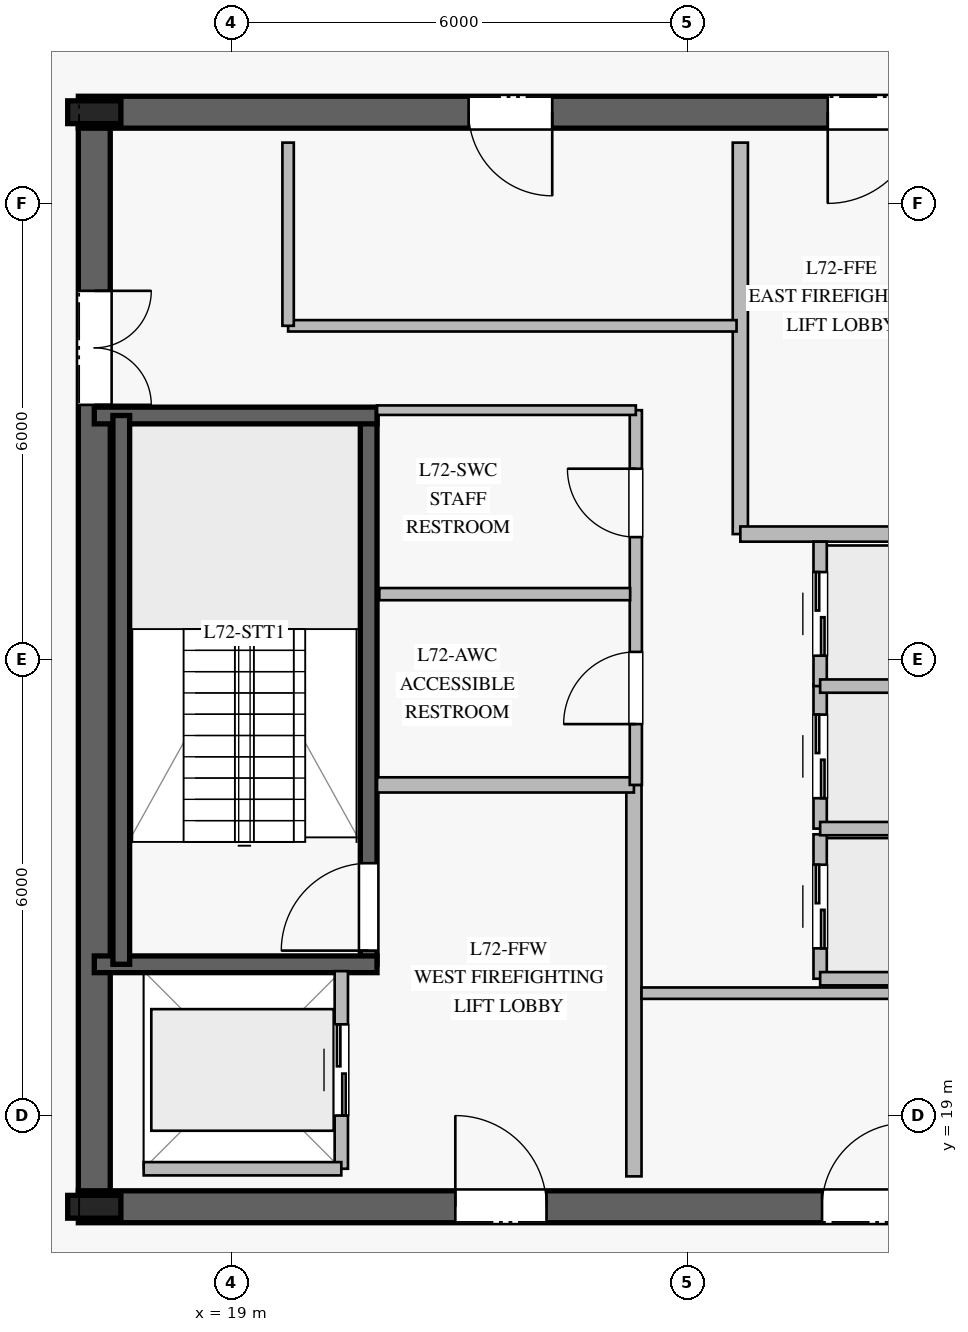
"""IFC4 building model, lengths in metres.
Left out: names, types, materials, properties, quantities, classifications, styles, units other than length and angle.
Written with IfcOpenShell. Run it as: python <this file> out.ifc"""

import sys

from ifc_helpers import new_model, si_unit, direction, frame, frame_2d, origin, origin_2d, place, context, subcontext, project, spatial, rectangle, i_section, extrude, element, fill, save


model = new_model("IFC4")
c1 = context("Model", 3, precision=1e-05, world=origin(), true_north=direction((0.0, 1.0)))
c2 = subcontext(c1, "Body", "Model", "MODEL_VIEW")
j1 = project(units=[si_unit("LENGTHUNIT", "METRE"), si_unit("PLANEANGLEUNIT", "RADIAN")], contexts=[c1])
p1 = place(None, origin())
s1 = spatial("IfcSite", under=j1, at=p1, CompositionType="ELEMENT")
p2 = place(p1, origin())
s2 = spatial("IfcBuilding", under=s1, at=p2, CompositionType="ELEMENT")
p3 = place(p2, frame((0.0, 0.0, 298.2)))
s3 = spatial("IfcBuildingStorey", under=s2, at=p3, CompositionType="ELEMENT", Elevation=298.2)
p4 = place(p3, frame((16.99, 17.8, 0.0), z_axis=(0.0, 0.0, 1.0), x_axis=(1.0, 0.0, 0.0)))
e1 = element("IfcWall", 1, at=p4, inside=s3, PredefinedType="SHEAR", context=c2, shape_type="SweptSolid", body=[
    extrude(rectangle(XDim=16.02, YDim=0.42, at=frame_2d((8.01, 0.0))), origin(), (0.0, 0.0, 1.0), 3.78),
])
p5 = place(p4, frame((4.96, 0.0, 0.0)))
e2 = element("IfcOpeningElement", 2, at=p5, cuts=e1, PredefinedType="OPENING", context=c2, shape_type="SweptSolid", body=[
    extrude(rectangle(XDim=1.2, YDim=2.25, at=frame_2d((0.6, 1.125))), frame((0.0, 0.22, 0.0), z_axis=(0.0, -1.0, 0.0), x_axis=(1.0, 0.0, 0.0)), (0.0, 0.0, 1.0), 0.44),
])
p6 = place(p4, frame((13.91, 0.0, 0.0)))
e3 = element("IfcOpeningElement", 3, at=p6, cuts=e1, PredefinedType="OPENING", context=c2, shape_type="SweptSolid", body=[
    extrude(rectangle(XDim=0.9, YDim=2.1, at=frame_2d((0.45, 1.05))), frame((0.0, 0.22, 0.0), z_axis=(0.0, -1.0, 0.0), x_axis=(1.0, 0.0, 0.0)), (0.0, 0.0, 1.0), 0.44),
])
p7 = place(p4, frame((9.785, 0.0, 0.0)))
e4 = element("IfcOpeningElement", 4, at=p7, cuts=e1, PredefinedType="OPENING", context=c2, shape_type="SweptSolid", body=[
    extrude(rectangle(XDim=1.1, YDim=2.2, at=frame_2d((0.55, 1.1))), frame((0.0, 0.22, 0.0), z_axis=(0.0, -1.0, 0.0), x_axis=(1.0, 0.0, 0.0)), (0.0, 0.0, 1.0), 0.44),
])
p8 = place(p3, frame((33.01, 32.2, 0.0), z_axis=(0.0, 0.0, 1.0), x_axis=(-1.0, 0.0, 0.0)))
e5 = element("IfcWall", 5, at=p8, inside=s3, PredefinedType="SHEAR", context=c2, shape_type="SweptSolid", body=[
    extrude(rectangle(XDim=16.02, YDim=0.42, at=frame_2d((8.01, 0.0))), origin(), (0.0, 0.0, 1.0), 3.78),
])
p9 = place(p8, frame((4.96, 0.0, 0.0)))
e6 = element("IfcOpeningElement", 6, at=p9, cuts=e5, PredefinedType="OPENING", context=c2, shape_type="SweptSolid", body=[
    extrude(rectangle(XDim=1.2, YDim=2.25, at=frame_2d((0.6, 1.125))), frame((0.0, 0.22, 0.0), z_axis=(0.0, -1.0, 0.0), x_axis=(1.0, 0.0, 0.0)), (0.0, 0.0, 1.0), 0.44),
])
p10 = place(p8, frame((9.785, 0.0, 0.0)))
e7 = element("IfcOpeningElement", 7, at=p10, cuts=e5, PredefinedType="OPENING", context=c2, shape_type="SweptSolid", body=[
    extrude(rectangle(XDim=1.1, YDim=2.2, at=frame_2d((0.55, 1.1))), frame((0.0, 0.22, 0.0), z_axis=(0.0, -1.0, 0.0), x_axis=(1.0, 0.0, 0.0)), (0.0, 0.0, 1.0), 0.44),
])
p11 = place(p3, frame((17.2, 31.99, 0.0), z_axis=(0.0, 0.0, 1.0), x_axis=(0.0, -1.0, 0.0)))
e8 = element("IfcWall", 8, at=p11, inside=s3, PredefinedType="SHEAR", context=c2, shape_type="SweptSolid", body=[
    extrude(rectangle(XDim=13.98, YDim=0.42, at=frame_2d((6.99, 0.0))), origin(), (0.0, 0.0, 1.0), 3.78),
])
p12 = place(p11, frame((2.14, 0.0, 0.0)))
e9 = element("IfcOpeningElement", 9, at=p12, cuts=e8, PredefinedType="OPENING", context=c2, shape_type="SweptSolid", body=[
    extrude(rectangle(XDim=1.5, YDim=2.2, at=frame_2d((0.75, 1.1))), frame((0.0, 0.22, 0.0), z_axis=(0.0, -1.0, 0.0), x_axis=(1.0, 0.0, 0.0)), (0.0, 0.0, 1.0), 0.44),
])
for number, where, z_axis, x_axis in (
    (10, (17.2, 17.8, 0.0), (0.0, 0.0, 1.0), (1.0, 0.0, 0.0)),
    (11, (17.2, 32.2, 0.0), (0.0, 0.0, 1.0), (1.0, 0.0, 0.0)),
):
    element("IfcColumn", number, at=place(p3, frame(where, z_axis=z_axis, x_axis=x_axis)), inside=s3, PredefinedType="COLUMN", context=c2, shape_type="SweptSolid", body=[
        extrude(i_section(OverallWidth=0.3, OverallDepth=0.7, WebThickness=0.017, FlangeThickness=0.032, at=origin_2d()), origin(), (0.0, 0.0, 1.0), 4.0),
    ])
p13 = place(p3, frame((20.81, 20.99, 0.0), z_axis=(0.0, 0.0, 1.0), x_axis=(0.0, 1.0, 0.0)))
e12 = element("IfcWall", 12, at=p13, inside=s3, PredefinedType="SOLIDWALL", context=c2, shape_type="SweptSolid", body=[
    extrude(rectangle(XDim=7.22, YDim=0.22, at=frame_2d((3.61, 0.0))), origin(), (0.0, 0.0, 1.0), 3.78),
])
p14 = place(p13, frame((0.18, 0.0, 0.0)))
e13 = element("IfcOpeningElement", 13, at=p14, cuts=e12, PredefinedType="OPENING", context=c2, shape_type="SweptSolid", body=[
    extrude(rectangle(XDim=1.15, YDim=2.2, at=frame_2d((0.575, 1.1))), frame((0.0, 0.12, 0.0), z_axis=(0.0, -1.0, 0.0), x_axis=(1.0, 0.0, 0.0)), (0.0, 0.0, 1.0), 0.24),
])
for number, where, z_axis, x_axis in (
    (14, (17.2, 20.99, 0.0), (0.0, 0.0, 1.0), (1.0, 0.0, 0.0)),
    (15, (17.2, 28.21, 0.0), (0.0, 0.0, 1.0), (1.0, 0.0, 0.0)),
):
    element("IfcWall", number, at=place(p3, frame(where, z_axis=z_axis, x_axis=x_axis)), inside=s3, PredefinedType="SOLIDWALL", context=c2, shape_type="SweptSolid", body=[
        extrude(rectangle(XDim=3.72, YDim=0.22, at=frame_2d((1.86, 0.0))), origin(), (0.0, 0.0, 1.0), 3.78),
    ])
p15 = place(p3, frame((17.555, 28.21, 0.0), z_axis=(0.0, 0.0, 1.0), x_axis=(0.0, -1.0, 0.0)))
e16 = element("IfcWall", 16, at=p15, inside=s3, PredefinedType="SOLIDWALL", context=c2, shape_type="SweptSolid", body=[
    extrude(rectangle(XDim=7.22, YDim=0.22, at=frame_2d((3.61, 0.0))), origin(), (0.0, 0.0, 1.0), 3.78),
])
p16 = place(p3, frame((24.3, 18.2, 0.0), z_axis=(0.0, 0.0, 1.0), x_axis=(0.0, 1.0, 0.0)))
e17 = element("IfcWall", 17, at=p16, inside=s3, PredefinedType="PARTITIONING", context=c2, shape_type="SweptSolid", body=[
    extrude(rectangle(XDim=5.15, YDim=0.2, at=frame_2d((2.575, 0.0))), origin(), (0.0, 0.0, 1.0), 3.78),
])
p17 = place(p3, frame((20.92, 23.35, 0.0), z_axis=(0.0, 0.0, 1.0), x_axis=(1.0, 0.0, 0.0)))
e18 = element("IfcWall", 18, at=p17, inside=s3, PredefinedType="PARTITIONING", context=c2, shape_type="SweptSolid", body=[
    extrude(rectangle(XDim=3.38, YDim=0.2, at=frame_2d((1.69, 0.0))), origin(), (0.0, 0.0, 1.0), 3.78),
])
p18 = place(p3, frame((25.7, 26.65, 0.0), z_axis=(0.0, 0.0, 1.0), x_axis=(0.0, 1.0, 0.0)))
e19 = element("IfcWall", 19, at=p18, inside=s3, PredefinedType="PARTITIONING", context=c2, shape_type="SweptSolid", body=[
    extrude(rectangle(XDim=5.15, YDim=0.2, at=frame_2d((2.575, 0.0))), origin(), (0.0, 0.0, 1.0), 3.78),
])
p19 = place(p3, frame((25.7, 26.65, 0.0), z_axis=(0.0, 0.0, 1.0), x_axis=(1.0, 0.0, 0.0)))
e20 = element("IfcWall", 20, at=p19, inside=s3, PredefinedType="PARTITIONING", context=c2, shape_type="SweptSolid", body=[
    extrude(rectangle(XDim=3.38, YDim=0.2, at=frame_2d((1.69, 0.0))), origin(), (0.0, 0.0, 1.0), 3.78),
])
p20 = place(p3, frame((24.325, 23.35, 0.0), z_axis=(0.0, 0.0, 1.0), x_axis=(0.0, 1.0, 0.0)))
e21 = element("IfcWall", 21, at=p20, inside=s3, PredefinedType="PLUMBINGWALL", context=c2, shape_type="SweptSolid", body=[
    extrude(rectangle(XDim=4.93, YDim=0.16, at=frame_2d((2.465, 0.0))), origin(), (0.0, 0.0, 1.0), 3.78),
])
p21 = place(p20, frame((0.8, 0.0, 0.0)))
e22 = element("IfcOpeningElement", 22, at=p21, cuts=e21, PredefinedType="OPENING", context=c2, shape_type="SweptSolid", body=[
    extrude(rectangle(XDim=0.95, YDim=2.1, at=frame_2d((0.475, 1.05))), frame((0.0, 0.09, 0.0), z_axis=(0.0, -1.0, 0.0), x_axis=(1.0, 0.0, 0.0)), (0.0, 0.0, 1.0), 0.18),
])
p22 = place(p20, frame((3.26, 0.0, 0.0)))
e23 = element("IfcOpeningElement", 23, at=p22, cuts=e21, PredefinedType="OPENING", context=c2, shape_type="SweptSolid", body=[
    extrude(rectangle(XDim=0.9, YDim=2.1, at=frame_2d((0.45, 1.05))), frame((0.0, 0.09, 0.0), z_axis=(0.0, -1.0, 0.0), x_axis=(1.0, 0.0, 0.0)), (0.0, 0.0, 1.0), 0.18),
])
p23 = place(p3, frame((20.92, 28.28, 0.0), z_axis=(0.0, 0.0, 1.0), x_axis=(1.0, 0.0, 0.0)))
e24 = element("IfcWall", 24, at=p23, inside=s3, PredefinedType="PARTITIONING", context=c2, shape_type="SweptSolid", body=[
    extrude(rectangle(XDim=3.405, YDim=0.125, at=frame_2d((1.703, 0.0))), origin(), (0.0, 0.0, 1.0), 3.78),
])
p24 = place(p3, frame((20.95, 25.86, 0.0), z_axis=(0.0, 0.0, 1.0), x_axis=(1.0, 0.0, 0.0)))
e25 = element("IfcWall", 25, at=p24, inside=s3, PredefinedType="PLUMBINGWALL", context=c2, shape_type="SweptSolid", body=[
    extrude(rectangle(XDim=3.3, YDim=0.16, at=frame_2d((1.65, 0.0))), origin(), (0.0, 0.0, 1.0), 3.78),
])
p25 = place(p3, frame((24.4, 20.61, 0.0), z_axis=(0.0, 0.0, 1.0), x_axis=(1.0, 0.0, 0.0)))
e26 = element("IfcWall", 26, at=p25, inside=s3, PredefinedType="PARTITIONING", context=c2, shape_type="SweptSolid", body=[
    extrude(rectangle(XDim=5.9, YDim=0.15, at=frame_2d((2.95, 0.0))), origin(), (0.0, 0.0, 1.0), 3.78),
])
p26 = place(p3, frame((19.75, 29.39, 0.0), z_axis=(0.0, 0.0, 1.0), x_axis=(1.0, 0.0, 0.0)))
e27 = element("IfcWall", 27, at=p26, inside=s3, PredefinedType="PARTITIONING", context=c2, shape_type="SweptSolid", body=[
    extrude(rectangle(XDim=5.9, YDim=0.15, at=frame_2d((2.95, 0.0))), origin(), (0.0, 0.0, 1.0), 3.78),
])
p27 = place(p3, frame((19.75, 29.39, 0.0), z_axis=(0.0, 0.0, 1.0), x_axis=(0.0, 1.0, 0.0)))
e28 = element("IfcWall", 28, at=p27, inside=s3, PredefinedType="PARTITIONING", context=c2, shape_type="SweptSolid", body=[
    extrude(rectangle(XDim=2.41, YDim=0.15, at=frame_2d((1.205, 0.0))), origin(), (0.0, 0.0, 1.0), 3.78),
])
p28 = place(p3, frame((26.75, 20.8, 0.0), z_axis=(0.0, 0.0, 1.0), x_axis=(0.0, 1.0, 0.0)))
e29 = element("IfcWall", 29, at=p28, inside=s3, PredefinedType="PARTITIONING", context=c2, shape_type="SweptSolid", body=[
    extrude(rectangle(XDim=1.9, YDim=0.175, at=frame_2d((0.95, 0.0))), origin(), (0.0, 0.0, 1.0), 3.78),
])
p29 = place(p28, frame((0.4, 0.0, 0.0)))
e30 = element("IfcOpeningElement", 30, at=p29, cuts=e29, PredefinedType="OPENING", context=c2, shape_type="SweptSolid", body=[
    extrude(rectangle(XDim=1.1, YDim=2.2, at=frame_2d((0.55, 1.1))), frame((0.0, 0.098, 0.0), z_axis=(0.0, -1.0, 0.0), x_axis=(1.0, 0.0, 0.0)), (0.0, 0.0, 1.0), 0.195),
])
p30 = place(p3, frame((26.75, 20.8, 0.0), z_axis=(0.0, 0.0, 1.0), x_axis=(1.0, 0.0, 0.0)))
e31 = element("IfcWall", 31, at=p30, inside=s3, PredefinedType="PARTITIONING", context=c2, shape_type="SweptSolid", body=[
    extrude(rectangle(XDim=2.35, YDim=0.175, at=frame_2d((1.175, 0.0))), origin(), (0.0, 0.0, 1.0), 3.78),
])
p31 = place(p3, frame((26.75, 22.775, 0.0), z_axis=(0.0, 0.0, 1.0), x_axis=(0.0, 1.0, 0.0)))
e32 = element("IfcWall", 32, at=p31, inside=s3, PredefinedType="PARTITIONING", context=c2, shape_type="SweptSolid", body=[
    extrude(rectangle(XDim=1.9, YDim=0.175, at=frame_2d((0.95, 0.0))), origin(), (0.0, 0.0, 1.0), 3.78),
])
p32 = place(p31, frame((0.4, 0.0, 0.0)))
e33 = element("IfcOpeningElement", 33, at=p32, cuts=e32, PredefinedType="OPENING", context=c2, shape_type="SweptSolid", body=[
    extrude(rectangle(XDim=1.1, YDim=2.2, at=frame_2d((0.55, 1.1))), frame((0.0, 0.098, 0.0), z_axis=(0.0, -1.0, 0.0), x_axis=(1.0, 0.0, 0.0)), (0.0, 0.0, 1.0), 0.195),
])
p33 = place(p3, frame((26.75, 22.775, 0.0), z_axis=(0.0, 0.0, 1.0), x_axis=(1.0, 0.0, 0.0)))
e34 = element("IfcWall", 34, at=p33, inside=s3, PredefinedType="PARTITIONING", context=c2, shape_type="SweptSolid", body=[
    extrude(rectangle(XDim=2.35, YDim=0.175, at=frame_2d((1.175, 0.0))), origin(), (0.0, 0.0, 1.0), 3.78),
])
p34 = place(p3, frame((26.75, 24.65, 0.0), z_axis=(0.0, 0.0, 1.0), x_axis=(0.0, 1.0, 0.0)))
e35 = element("IfcWall", 35, at=p34, inside=s3, PredefinedType="PARTITIONING", context=c2, shape_type="SweptSolid", body=[
    extrude(rectangle(XDim=1.9, YDim=0.175, at=frame_2d((0.95, 0.0))), origin(), (0.0, 0.0, 1.0), 3.78),
])
p35 = place(p34, frame((0.4, 0.0, 0.0)))
e36 = element("IfcOpeningElement", 36, at=p35, cuts=e35, PredefinedType="OPENING", context=c2, shape_type="SweptSolid", body=[
    extrude(rectangle(XDim=1.1, YDim=2.2, at=frame_2d((0.55, 1.1))), frame((0.0, 0.098, 0.0), z_axis=(0.0, -1.0, 0.0), x_axis=(1.0, 0.0, 0.0)), (0.0, 0.0, 1.0), 0.195),
])
p36 = place(p3, frame((26.75, 24.65, 0.0), z_axis=(0.0, 0.0, 1.0), x_axis=(1.0, 0.0, 0.0)))
e37 = element("IfcWall", 37, at=p36, inside=s3, PredefinedType="PARTITIONING", context=c2, shape_type="SweptSolid", body=[
    extrude(rectangle(XDim=2.35, YDim=0.175, at=frame_2d((1.175, 0.0))), origin(), (0.0, 0.0, 1.0), 3.78),
])
p37 = place(p3, frame((20.45, 18.3, 0.0), z_axis=(0.0, 0.0, 1.0), x_axis=(0.0, 1.0, 0.0)))
e38 = element("IfcWall", 38, at=p37, inside=s3, PredefinedType="PARTITIONING", context=c2, shape_type="SweptSolid", body=[
    extrude(rectangle(XDim=2.6, YDim=0.175, at=frame_2d((1.3, 0.0))), origin(), (0.0, 0.0, 1.0), 3.78),
])
p38 = place(p37, frame((0.7, 0.0, 0.0)))
e39 = element("IfcOpeningElement", 39, at=p38, cuts=e38, PredefinedType="OPENING", context=c2, shape_type="SweptSolid", body=[
    extrude(rectangle(XDim=1.2, YDim=2.2, at=frame_2d((0.6, 1.1))), frame((0.0, 0.098, 0.0), z_axis=(0.0, -1.0, 0.0), x_axis=(1.0, 0.0, 0.0)), (0.0, 0.0, 1.0), 0.195),
])
p39 = place(p3, frame((17.85, 18.3, 0.0), z_axis=(0.0, 0.0, 1.0), x_axis=(1.0, 0.0, 0.0)))
e40 = element("IfcWall", 40, at=p39, inside=s3, PredefinedType="PARTITIONING", context=c2, shape_type="SweptSolid", body=[
    extrude(rectangle(XDim=2.6, YDim=0.175, at=frame_2d((1.3, 0.0))), origin(), (0.0, 0.0, 1.0), 3.78),
])
p40 = place(p14, origin())
e41 = element("IfcDoor", 41, at=p40, inside=s3, OperationType="SINGLE_SWING_LEFT", PredefinedType="DOOR", context=c2, shape_type="SweptSolid", body=[
    extrude(rectangle(XDim=1.15, YDim=2.2, at=frame_2d((0.575, 1.1))), frame((0.0, 0.025, 0.0), z_axis=(0.0, -1.0, 0.0), x_axis=(1.0, 0.0, 0.0)), (0.0, 0.0, 1.0), 0.05),
])
fill(e13, e41)
p41 = place(p5, origin())
e42 = element("IfcDoor", 42, at=p41, inside=s3, OperationType="SINGLE_SWING_LEFT", PredefinedType="DOOR", context=c2, shape_type="SweptSolid", body=[
    extrude(rectangle(XDim=1.2, YDim=2.25, at=frame_2d((0.6, 1.125))), frame((0.0, 0.025, 0.0), z_axis=(0.0, -1.0, 0.0), x_axis=(1.0, 0.0, 0.0)), (0.0, 0.0, 1.0), 0.05),
])
fill(e2, e42)
p42 = place(p9, origin())
e43 = element("IfcDoor", 43, at=p42, inside=s3, OperationType="SINGLE_SWING_RIGHT", PredefinedType="DOOR", context=c2, shape_type="SweptSolid", body=[
    extrude(rectangle(XDim=1.2, YDim=2.25, at=frame_2d((0.6, 1.125))), frame((0.0, 0.025, 0.0), z_axis=(0.0, -1.0, 0.0), x_axis=(1.0, 0.0, 0.0)), (0.0, 0.0, 1.0), 0.05),
])
fill(e6, e43)
p43 = place(p12, origin())
e44 = element("IfcDoor", 44, at=p43, inside=s3, OperationType="DOUBLE_DOOR_SINGLE_SWING", PredefinedType="DOOR", context=c2, shape_type="SweptSolid", body=[
    extrude(rectangle(XDim=1.5, YDim=2.2, at=frame_2d((0.75, 1.1))), frame((0.0, 0.025, 0.0), z_axis=(0.0, -1.0, 0.0), x_axis=(1.0, 0.0, 0.0)), (0.0, 0.0, 1.0), 0.05),
])
fill(e9, e44)
p44 = place(p21, origin())
e45 = element("IfcDoor", 45, at=p44, inside=s3, OperationType="SINGLE_SWING_LEFT", PredefinedType="DOOR", context=c2, shape_type="SweptSolid", body=[
    extrude(rectangle(XDim=0.95, YDim=2.1, at=frame_2d((0.475, 1.05))), frame((0.0, 0.025, 0.0), z_axis=(0.0, -1.0, 0.0), x_axis=(1.0, 0.0, 0.0)), (0.0, 0.0, 1.0), 0.05),
])
fill(e22, e45)
p45 = place(p22, origin())
e46 = element("IfcDoor", 46, at=p45, inside=s3, OperationType="SINGLE_SWING_RIGHT", PredefinedType="DOOR", context=c2, shape_type="SweptSolid", body=[
    extrude(rectangle(XDim=0.9, YDim=2.1, at=frame_2d((0.45, 1.05))), frame((0.0, 0.025, 0.0), z_axis=(0.0, -1.0, 0.0), x_axis=(1.0, 0.0, 0.0)), (0.0, 0.0, 1.0), 0.05),
])
fill(e23, e46)
p46 = place(p7, origin())
e47 = element("IfcDoor", 47, at=p46, inside=s3, OperationType="SINGLE_SWING_RIGHT", PredefinedType="DOOR", context=c2, shape_type="SweptSolid", body=[
    extrude(rectangle(XDim=1.1, YDim=2.2, at=frame_2d((0.55, 1.1))), frame((0.0, 0.025, 0.0), z_axis=(0.0, -1.0, 0.0), x_axis=(1.0, 0.0, 0.0)), (0.0, 0.0, 1.0), 0.05),
])
fill(e4, e47)
p47 = place(p10, origin())
e48 = element("IfcDoor", 48, at=p47, inside=s3, OperationType="SINGLE_SWING_LEFT", PredefinedType="DOOR", context=c2, shape_type="SweptSolid", body=[
    extrude(rectangle(XDim=1.1, YDim=2.2, at=frame_2d((0.55, 1.1))), frame((0.0, 0.025, 0.0), z_axis=(0.0, -1.0, 0.0), x_axis=(1.0, 0.0, 0.0)), (0.0, 0.0, 1.0), 0.05),
])
fill(e7, e48)
p48 = place(p29, origin())
e49 = element("IfcDoor", 49, at=p48, inside=s3, OperationType="DOUBLE_DOOR_SLIDING", PredefinedType="DOOR", context=c2, shape_type="SweptSolid", body=[
    extrude(rectangle(XDim=1.1, YDim=2.2, at=frame_2d((0.55, 1.1))), frame((0.0, 0.025, 0.0), z_axis=(0.0, -1.0, 0.0), x_axis=(1.0, 0.0, 0.0)), (0.0, 0.0, 1.0), 0.05),
])
fill(e30, e49)
p49 = place(p32, origin())
e50 = element("IfcDoor", 50, at=p49, inside=s3, OperationType="DOUBLE_DOOR_SLIDING", PredefinedType="DOOR", context=c2, shape_type="SweptSolid", body=[
    extrude(rectangle(XDim=1.1, YDim=2.2, at=frame_2d((0.55, 1.1))), frame((0.0, 0.025, 0.0), z_axis=(0.0, -1.0, 0.0), x_axis=(1.0, 0.0, 0.0)), (0.0, 0.0, 1.0), 0.05),
])
fill(e33, e50)
p50 = place(p35, origin())
e51 = element("IfcDoor", 51, at=p50, inside=s3, OperationType="DOUBLE_DOOR_SLIDING", PredefinedType="DOOR", context=c2, shape_type="SweptSolid", body=[
    extrude(rectangle(XDim=1.1, YDim=2.2, at=frame_2d((0.55, 1.1))), frame((0.0, 0.025, 0.0), z_axis=(0.0, -1.0, 0.0), x_axis=(1.0, 0.0, 0.0)), (0.0, 0.0, 1.0), 0.05),
])
fill(e36, e51)
p51 = place(p38, origin())
e52 = element("IfcDoor", 52, at=p51, inside=s3, OperationType="DOUBLE_DOOR_SLIDING", PredefinedType="DOOR", context=c2, shape_type="SweptSolid", body=[
    extrude(rectangle(XDim=1.2, YDim=2.2, at=frame_2d((0.6, 1.1))), frame((0.0, 0.025, 0.0), z_axis=(0.0, -1.0, 0.0), x_axis=(1.0, 0.0, 0.0)), (0.0, 0.0, 1.0), 0.05),
])
fill(e39, e52)
save(model, sys.argv[1])
